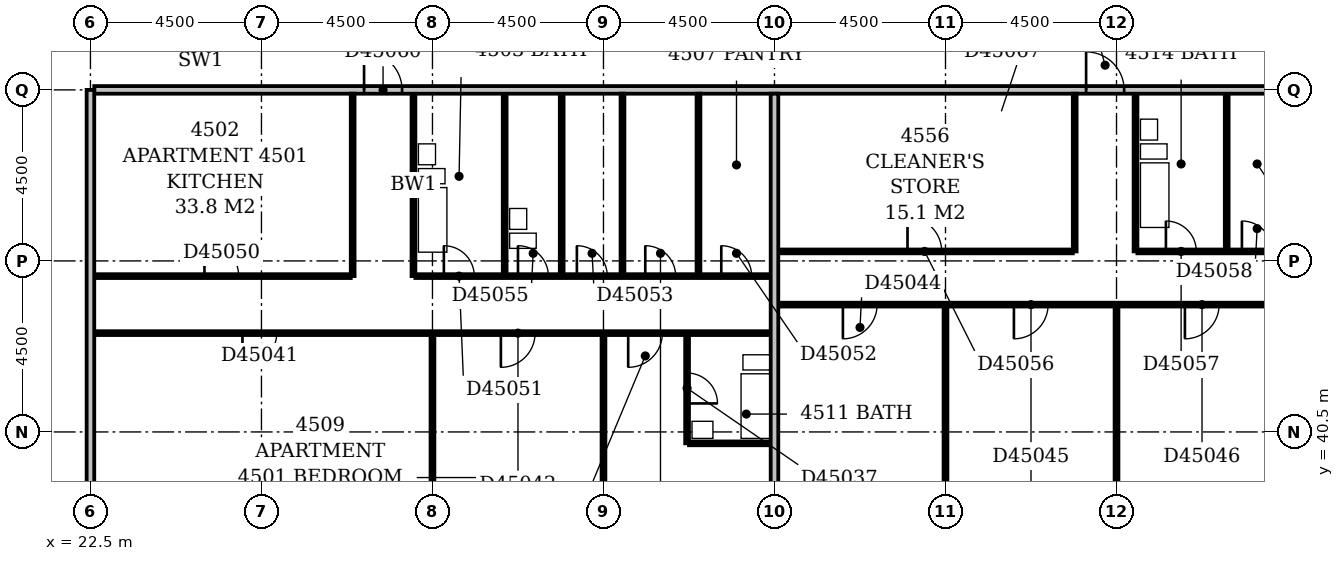
"""IFC4 building model, lengths in metres.
Left out: names, types, materials, properties, quantities, classifications, styles, units other than length and angle.
Written with IfcOpenShell. Run it as: python <this file> out.ifc"""

import sys

from ifc_helpers import new_model, si_unit, direction, frame, frame_2d, origin, place, context, subcontext, project, spatial, rectangle, extrude, element, fill, save


model = new_model("IFC4")
c1 = context("Model", 3, precision=1e-05, world=origin(), true_north=direction((0.0, 1.0)))
c2 = subcontext(c1, "Body", "Model", "MODEL_VIEW")
j1 = project(units=[si_unit("LENGTHUNIT", "METRE"), si_unit("PLANEANGLEUNIT", "RADIAN")], contexts=[c1])
p1 = place(None, origin())
s1 = spatial("IfcSite", under=j1, at=p1, CompositionType="ELEMENT")
p2 = place(p1, origin())
s2 = spatial("IfcBuilding", under=s1, at=p2, CompositionType="ELEMENT")
p3 = place(p2, frame((0.0, 0.0, 179.0)))
s3 = spatial("IfcBuildingStorey", under=s2, at=p3, CompositionType="ELEMENT", Elevation=179.0)
p4 = place(p3, frame((22.5, 36.45, 0.0), z_axis=(0.0, 0.0, 1.0), x_axis=(0.0, 1.0, 0.0)))
e1 = element("IfcWall", 1, at=p4, inside=s3, PredefinedType="PARTITIONING", context=c2, shape_type="SweptSolid", body=[
    extrude(rectangle(XDim=13.05, YDim=0.2, at=frame_2d((6.525, 0.0))), origin(), (0.0, 0.0, 1.0), 3.3),
])
p5 = place(p3, frame((31.5, 36.45, 0.0), z_axis=(0.0, 0.0, 1.0), x_axis=(0.0, 1.0, 0.0)))
e2 = element("IfcWall", 2, at=p5, inside=s3, PredefinedType="PARTITIONING", context=c2, shape_type="SweptSolid", body=[
    extrude(rectangle(XDim=6.6, YDim=0.1, at=frame_2d((3.3, 0.0))), origin(), (0.0, 0.0, 1.0), 3.3),
])
p6 = place(p3, frame((36.0, 36.45, 0.0), z_axis=(0.0, 0.0, 1.0), x_axis=(0.0, 1.0, 0.0)))
e3 = element("IfcWall", 3, at=p6, inside=s3, PredefinedType="PARTITIONING", context=c2, shape_type="SweptSolid", body=[
    extrude(rectangle(XDim=6.6, YDim=0.1, at=frame_2d((3.3, 0.0))), origin(), (0.0, 0.0, 1.0), 2.4),
])
p7 = place(p3, frame((40.5, 36.45, 0.0), z_axis=(0.0, 0.0, 1.0), x_axis=(0.0, 1.0, 0.0)))
e4 = element("IfcWall", 4, at=p7, inside=s3, PredefinedType="PARTITIONING", context=c2, shape_type="SweptSolid", body=[
    extrude(rectangle(XDim=12.95, YDim=0.2, at=frame_2d((6.475, 0.0))), origin(), (0.0, 0.0, 1.0), 3.3),
])
p8 = place(p3, frame((45.0, 36.45, 0.0), z_axis=(0.0, 0.0, 1.0), x_axis=(0.0, 1.0, 0.0)))
e5 = element("IfcWall", 5, at=p8, inside=s3, PredefinedType="PARTITIONING", context=c2, shape_type="SweptSolid", body=[
    extrude(rectangle(XDim=7.35, YDim=0.1, at=frame_2d((3.675, 0.0))), origin(), (0.0, 0.0, 1.0), 2.6),
])
p9 = place(p3, frame((49.5, 36.45, 0.0), z_axis=(0.0, 0.0, 1.0), x_axis=(0.0, 1.0, 0.0)))
e6 = element("IfcWall", 6, at=p9, inside=s3, PredefinedType="PARTITIONING", context=c2, shape_type="SweptSolid", body=[
    extrude(rectangle(XDim=7.35, YDim=0.1, at=frame_2d((3.675, 0.0))), origin(), (0.0, 0.0, 1.0), 3.3),
])
p10 = place(p3, frame((38.2, 40.2, 0.0), z_axis=(0.0, 0.0, 1.0), x_axis=(0.0, 1.0, 0.0)))
e7 = element("IfcWall", 7, at=p10, inside=s3, PredefinedType="PLUMBINGWALL", context=c2, shape_type="SweptSolid", body=[
    extrude(rectangle(XDim=2.85, YDim=0.1, at=frame_2d((1.425, 0.0))), origin(), (0.0, 0.0, 1.0), 3.3),
])
p11 = place(p10, frame((1.05, 0.0, 0.0)))
e8 = element("IfcOpeningElement", 8, at=p11, cuts=e7, PredefinedType="OPENING", context=c2, shape_type="SweptSolid", body=[
    extrude(rectangle(XDim=0.8, YDim=2.1, at=frame_2d((0.4, 1.05))), frame((0.0, 0.062, 0.0), z_axis=(0.0, -1.0, 0.0), x_axis=(1.0, 0.0, 0.0)), (0.0, 0.0, 1.0), 0.124),
])
p12 = place(p3, frame((38.25, 40.2, 0.0), z_axis=(0.0, 0.0, 1.0), x_axis=(1.0, 0.0, 0.0)))
e9 = element("IfcWall", 9, at=p12, inside=s3, PredefinedType="PLUMBINGWALL", context=c2, shape_type="SweptSolid", body=[
    extrude(rectangle(XDim=2.15, YDim=0.1, at=frame_2d((1.075, 0.0))), origin(), (0.0, 0.0, 1.0), 3.3),
])
p13 = place(p3, frame((22.6, 43.1, 0.0), z_axis=(0.0, 0.0, 1.0), x_axis=(1.0, 0.0, 0.0)))
e10 = element("IfcWall", 10, at=p13, inside=s3, PredefinedType="PARTITIONING", context=c2, shape_type="SweptSolid", body=[
    extrude(rectangle(XDim=17.8, YDim=0.1, at=frame_2d((8.9, 0.0))), origin(), (0.0, 0.0, 1.0), 3.3),
])
p14 = place(p13, frame((3.9, 0.0, 0.0)))
e11 = element("IfcOpeningElement", 11, at=p14, cuts=e10, PredefinedType="OPENING", context=c2, shape_type="SweptSolid", body=[
    extrude(rectangle(XDim=0.9, YDim=2.1, at=frame_2d((0.45, 1.05))), frame((0.0, 0.062, 0.0), z_axis=(0.0, -1.0, 0.0), x_axis=(1.0, 0.0, 0.0)), (0.0, 0.0, 1.0), 0.124),
])
p15 = place(p13, frame((10.7, 0.0, 0.0)))
e12 = element("IfcOpeningElement", 12, at=p15, cuts=e10, PredefinedType="OPENING", context=c2, shape_type="SweptSolid", body=[
    extrude(rectangle(XDim=0.9, YDim=2.1, at=frame_2d((0.45, 1.05))), frame((0.0, 0.062, 0.0), z_axis=(0.0, -1.0, 0.0), x_axis=(1.0, 0.0, 0.0)), (0.0, 0.0, 1.0), 0.124),
])
p16 = place(p13, frame((14.05, 0.0, 0.0)))
e13 = element("IfcOpeningElement", 13, at=p16, cuts=e10, PredefinedType="OPENING", context=c2, shape_type="SweptSolid", body=[
    extrude(rectangle(XDim=0.9, YDim=2.1, at=frame_2d((0.45, 1.05))), frame((0.0, 0.062, 0.0), z_axis=(0.0, -1.0, 0.0), x_axis=(1.0, 0.0, 0.0)), (0.0, 0.0, 1.0), 0.124),
])
p17 = place(p3, frame((40.6, 43.85, 0.0), z_axis=(0.0, 0.0, 1.0), x_axis=(1.0, 0.0, 0.0)))
e14 = element("IfcWall", 14, at=p17, inside=s3, PredefinedType="PARTITIONING", context=c2, shape_type="SweptSolid", body=[
    extrude(rectangle(XDim=13.3, YDim=0.1, at=frame_2d((6.65, 0.0))), origin(), (0.0, 0.0, 1.0), 3.3),
])
p18 = place(p17, frame((1.7, 0.0, 0.0)))
e15 = element("IfcOpeningElement", 15, at=p18, cuts=e14, PredefinedType="OPENING", context=c2, shape_type="SweptSolid", body=[
    extrude(rectangle(XDim=0.9, YDim=2.1, at=frame_2d((0.45, 1.05))), frame((0.0, 0.062, 0.0), z_axis=(0.0, -1.0, 0.0), x_axis=(1.0, 0.0, 0.0)), (0.0, 0.0, 1.0), 0.124),
])
p19 = place(p17, frame((6.2, 0.0, 0.0)))
e16 = element("IfcOpeningElement", 16, at=p19, cuts=e14, PredefinedType="OPENING", context=c2, shape_type="SweptSolid", body=[
    extrude(rectangle(XDim=0.9, YDim=2.1, at=frame_2d((0.45, 1.05))), frame((0.0, 0.062, 0.0), z_axis=(0.0, -1.0, 0.0), x_axis=(1.0, 0.0, 0.0)), (0.0, 0.0, 1.0), 0.124),
])
p20 = place(p17, frame((10.7, 0.0, 0.0)))
e17 = element("IfcOpeningElement", 17, at=p20, cuts=e14, PredefinedType="OPENING", context=c2, shape_type="SweptSolid", body=[
    extrude(rectangle(XDim=0.9, YDim=2.1, at=frame_2d((0.45, 1.05))), frame((0.0, 0.062, 0.0), z_axis=(0.0, -1.0, 0.0), x_axis=(1.0, 0.0, 0.0)), (0.0, 0.0, 1.0), 0.124),
])
p21 = place(p3, frame((22.6, 44.6, 0.0), z_axis=(0.0, 0.0, 1.0), x_axis=(1.0, 0.0, 0.0)))
e18 = element("IfcWall", 18, at=p21, inside=s3, PredefinedType="PARTITIONING", context=c2, shape_type="SweptSolid", body=[
    extrude(rectangle(XDim=6.75, YDim=0.1, at=frame_2d((3.375, 0.0))), origin(), (0.0, 0.0, 1.0), 3.3),
])
p22 = place(p21, frame((2.9, 0.0, 0.0)))
e19 = element("IfcOpeningElement", 19, at=p22, cuts=e18, PredefinedType="OPENING", context=c2, shape_type="SweptSolid", body=[
    extrude(rectangle(XDim=0.9, YDim=2.1, at=frame_2d((0.45, 1.05))), frame((0.0, 0.062, 0.0), z_axis=(0.0, -1.0, 0.0), x_axis=(1.0, 0.0, 0.0)), (0.0, 0.0, 1.0), 0.124),
])
p23 = place(p3, frame((29.4, 44.6, 0.0), z_axis=(0.0, 0.0, 1.0), x_axis=(0.0, 1.0, 0.0)))
e20 = element("IfcWall", 20, at=p23, inside=s3, PredefinedType="PARTITIONING", context=c2, shape_type="SweptSolid", body=[
    extrude(rectangle(XDim=4.8, YDim=0.1, at=frame_2d((2.4, 0.0))), origin(), (0.0, 0.0, 1.0), 3.3),
])
p24 = place(p3, frame((31.0, 44.6, 0.0), z_axis=(0.0, 0.0, 1.0), x_axis=(0.0, 1.0, 0.0)))
e21 = element("IfcWall", 21, at=p24, inside=s3, PredefinedType="PLUMBINGWALL", context=c2, shape_type="SweptSolid", body=[
    extrude(rectangle(XDim=4.8, YDim=0.1, at=frame_2d((2.4, 0.0))), origin(), (0.0, 0.0, 1.0), 3.3),
])
p25 = place(p3, frame((31.05, 44.6, 0.0), z_axis=(0.0, 0.0, 1.0), x_axis=(1.0, 0.0, 0.0)))
e22 = element("IfcWall", 22, at=p25, inside=s3, PredefinedType="PARTITIONING", context=c2, shape_type="SweptSolid", body=[
    extrude(rectangle(XDim=9.35, YDim=0.1, at=frame_2d((4.675, 0.0))), origin(), (0.0, 0.0, 1.0), 3.3),
])
p26 = place(p25, frame((0.75, 0.0, 0.0)))
e23 = element("IfcOpeningElement", 23, at=p26, cuts=e22, PredefinedType="OPENING", context=c2, shape_type="SweptSolid", body=[
    extrude(rectangle(XDim=0.8, YDim=2.1, at=frame_2d((0.4, 1.05))), frame((0.0, 0.062, 0.0), z_axis=(0.0, -1.0, 0.0), x_axis=(1.0, 0.0, 0.0)), (0.0, 0.0, 1.0), 0.124),
])
p27 = place(p25, frame((8.05, 0.0, 0.0)))
e24 = element("IfcOpeningElement", 24, at=p27, cuts=e22, PredefinedType="OPENING", context=c2, shape_type="SweptSolid", body=[
    extrude(rectangle(XDim=0.8, YDim=2.1, at=frame_2d((0.4, 1.05))), frame((0.0, 0.062, 0.0), z_axis=(0.0, -1.0, 0.0), x_axis=(1.0, 0.0, 0.0)), (0.0, 0.0, 1.0), 0.124),
])
p28 = place(p25, frame((4.25, 0.0, 0.0)))
e25 = element("IfcOpeningElement", 25, at=p28, cuts=e22, PredefinedType="OPENING", context=c2, shape_type="SweptSolid", body=[
    extrude(rectangle(XDim=0.8, YDim=2.1, at=frame_2d((0.4, 1.05))), frame((0.0, 0.062, 0.0), z_axis=(0.0, -1.0, 0.0), x_axis=(1.0, 0.0, 0.0)), (0.0, 0.0, 1.0), 0.124),
])
p29 = place(p25, frame((6.05, 0.0, 0.0)))
e26 = element("IfcOpeningElement", 26, at=p29, cuts=e22, PredefinedType="OPENING", context=c2, shape_type="SweptSolid", body=[
    extrude(rectangle(XDim=0.8, YDim=2.1, at=frame_2d((0.4, 1.05))), frame((0.0, 0.062, 0.0), z_axis=(0.0, -1.0, 0.0), x_axis=(1.0, 0.0, 0.0)), (0.0, 0.0, 1.0), 0.124),
])
p30 = place(p25, frame((2.7, 0.0, 0.0)))
e27 = element("IfcOpeningElement", 27, at=p30, cuts=e22, PredefinedType="OPENING", context=c2, shape_type="SweptSolid", body=[
    extrude(rectangle(XDim=0.8, YDim=2.1, at=frame_2d((0.4, 1.05))), frame((0.0, 0.062, 0.0), z_axis=(0.0, -1.0, 0.0), x_axis=(1.0, 0.0, 0.0)), (0.0, 0.0, 1.0), 0.124),
])
for number, where, z_axis, x_axis in (
    (28, (33.4, 44.65, 0.0), (0.0, 0.0, 1.0), (0.0, 1.0, 0.0)),
    (29, (34.9, 44.65, 0.0), (0.0, 0.0, 1.0), (0.0, 1.0, 0.0)),
):
    element("IfcWall", number, at=place(p3, frame(where, z_axis=z_axis, x_axis=x_axis)), inside=s3, PredefinedType="PLUMBINGWALL", context=c2, shape_type="SweptSolid", body=[
        extrude(rectangle(XDim=4.75, YDim=0.1, at=frame_2d((2.375, 0.0))), origin(), (0.0, 0.0, 1.0), 3.3),
    ])
p31 = place(p3, frame((36.5, 44.65, 0.0), z_axis=(0.0, 0.0, 1.0), x_axis=(0.0, 1.0, 0.0)))
e30 = element("IfcWall", 30, at=p31, inside=s3, PredefinedType="PARTITIONING", context=c2, shape_type="SweptSolid", body=[
    extrude(rectangle(XDim=4.75, YDim=0.1, at=frame_2d((2.375, 0.0))), origin(), (0.0, 0.0, 1.0), 2.4),
])
p32 = place(p3, frame((38.5, 44.65, 0.0), z_axis=(0.0, 0.0, 1.0), x_axis=(0.0, 1.0, 0.0)))
e31 = element("IfcWall", 31, at=p32, inside=s3, PredefinedType="PARTITIONING", context=c2, shape_type="SweptSolid", body=[
    extrude(rectangle(XDim=4.75, YDim=0.1, at=frame_2d((2.375, 0.0))), origin(), (0.0, 0.0, 1.0), 3.3),
])
p33 = place(p3, frame((40.6, 45.25, 0.0), z_axis=(0.0, 0.0, 1.0), x_axis=(1.0, 0.0, 0.0)))
e32 = element("IfcWall", 32, at=p33, inside=s3, PredefinedType="PARTITIONING", context=c2, shape_type="SweptSolid", body=[
    extrude(rectangle(XDim=7.75, YDim=0.1, at=frame_2d((3.875, 0.0))), origin(), (0.0, 0.0, 1.0), 3.3),
])
p34 = place(p33, frame((3.4, 0.0, 0.0)))
e33 = element("IfcOpeningElement", 33, at=p34, cuts=e32, PredefinedType="OPENING", context=c2, shape_type="SweptSolid", body=[
    extrude(rectangle(XDim=0.9, YDim=2.1, at=frame_2d((0.45, 1.05))), frame((0.0, 0.062, 0.0), z_axis=(0.0, -1.0, 0.0), x_axis=(1.0, 0.0, 0.0)), (0.0, 0.0, 1.0), 0.124),
])
p35 = place(p3, frame((48.4, 45.25, 0.0), z_axis=(0.0, 0.0, 1.0), x_axis=(0.0, 1.0, 0.0)))
e34 = element("IfcWall", 34, at=p35, inside=s3, PredefinedType="PARTITIONING", context=c2, shape_type="SweptSolid", body=[
    extrude(rectangle(XDim=4.15, YDim=0.1, at=frame_2d((2.075, 0.0))), origin(), (0.0, 0.0, 1.0), 3.3),
])
p36 = place(p3, frame((50.0, 45.25, 0.0), z_axis=(0.0, 0.0, 1.0), x_axis=(0.0, 1.0, 0.0)))
e35 = element("IfcWall", 35, at=p36, inside=s3, PredefinedType="PLUMBINGWALL", context=c2, shape_type="SweptSolid", body=[
    extrude(rectangle(XDim=4.15, YDim=0.1, at=frame_2d((2.075, 0.0))), origin(), (0.0, 0.0, 1.0), 3.3),
])
p37 = place(p3, frame((50.05, 45.25, 0.0), z_axis=(0.0, 0.0, 1.0), x_axis=(1.0, 0.0, 0.0)))
e36 = element("IfcWall", 36, at=p37, inside=s3, PredefinedType="PARTITIONING", context=c2, shape_type="SweptSolid", body=[
    extrude(rectangle(XDim=3.85, YDim=0.1, at=frame_2d((1.925, 0.0))), origin(), (0.0, 0.0, 1.0), 3.3),
])
p38 = place(p37, frame((0.75, 0.0, 0.0)))
e37 = element("IfcOpeningElement", 37, at=p38, cuts=e36, PredefinedType="OPENING", context=c2, shape_type="SweptSolid", body=[
    extrude(rectangle(XDim=0.8, YDim=2.1, at=frame_2d((0.4, 1.05))), frame((0.0, 0.062, 0.0), z_axis=(0.0, -1.0, 0.0), x_axis=(1.0, 0.0, 0.0)), (0.0, 0.0, 1.0), 0.124),
])
p39 = place(p37, frame((2.75, 0.0, 0.0)))
e38 = element("IfcOpeningElement", 38, at=p39, cuts=e36, PredefinedType="OPENING", context=c2, shape_type="SweptSolid", body=[
    extrude(rectangle(XDim=0.8, YDim=2.1, at=frame_2d((0.4, 1.05))), frame((0.0, 0.062, 0.0), z_axis=(0.0, -1.0, 0.0), x_axis=(1.0, 0.0, 0.0)), (0.0, 0.0, 1.0), 0.124),
])
p40 = place(p3, frame((52.4, 45.3, 0.0), z_axis=(0.0, 0.0, 1.0), x_axis=(0.0, 1.0, 0.0)))
e39 = element("IfcWall", 39, at=p40, inside=s3, PredefinedType="PLUMBINGWALL", context=c2, shape_type="SweptSolid", body=[
    extrude(rectangle(XDim=4.1, YDim=0.1, at=frame_2d((2.05, 0.0))), origin(), (0.0, 0.0, 1.0), 3.3),
])
p41 = place(p3, frame((22.6, 49.5, 0.0), z_axis=(0.0, 0.0, 1.0), x_axis=(1.0, 0.0, 0.0)))
e40 = element("IfcWall", 40, at=p41, inside=s3, PredefinedType="PARTITIONING", context=c2, shape_type="SweptSolid", body=[
    extrude(rectangle(XDim=44.45, YDim=0.2, at=frame_2d((22.225, 0.0))), origin(), (0.0, 0.0, 1.0), 3.3),
])
p42 = place(p41, frame((7.1, 0.0, 0.0)))
e41 = element("IfcOpeningElement", 41, at=p42, cuts=e40, PredefinedType="OPENING", context=c2, shape_type="SweptSolid", body=[
    extrude(rectangle(XDim=1.0, YDim=2.1, at=frame_2d((0.5, 1.05))), frame((0.0, 0.112, 0.0), z_axis=(0.0, -1.0, 0.0), x_axis=(1.0, 0.0, 0.0)), (0.0, 0.0, 1.0), 0.224),
])
p43 = place(p41, frame((26.1, 0.0, 0.0)))
e42 = element("IfcOpeningElement", 42, at=p43, cuts=e40, PredefinedType="OPENING", context=c2, shape_type="SweptSolid", body=[
    extrude(rectangle(XDim=1.0, YDim=2.1, at=frame_2d((0.5, 1.05))), frame((0.0, 0.112, 0.0), z_axis=(0.0, -1.0, 0.0), x_axis=(1.0, 0.0, 0.0)), (0.0, 0.0, 1.0), 0.224),
])
p44 = place(p41, frame((31.7, 0.0, 0.0)))
e43 = element("IfcOpeningElement", 43, at=p44, cuts=e40, PredefinedType="OPENING", context=c2, shape_type="SweptSolid", body=[
    extrude(rectangle(XDim=1.0, YDim=2.1, at=frame_2d((0.5, 1.05))), frame((0.0, 0.112, 0.0), z_axis=(0.0, -1.0, 0.0), x_axis=(1.0, 0.0, 0.0)), (0.0, 0.0, 1.0), 0.224),
])
p45 = place(p11, frame((0.8, 0.0, 0.0), z_axis=(0.0, 0.0, 1.0), x_axis=(-1.0, 0.0, 0.0)))
e44 = element("IfcDoor", 44, at=p45, inside=s3, OperationType="SINGLE_SWING_RIGHT", PredefinedType="DOOR", context=c2, shape_type="SweptSolid", body=[
    extrude(rectangle(XDim=0.8, YDim=2.1, at=frame_2d((0.4, 1.05))), frame((0.0, 0.025, 0.0), z_axis=(0.0, -1.0, 0.0), x_axis=(1.0, 0.0, 0.0)), (0.0, 0.0, 1.0), 0.05),
])
fill(e8, e44)
p46 = place(p14, frame((0.9, 0.0, 0.0), z_axis=(0.0, 0.0, 1.0), x_axis=(-1.0, 0.0, 0.0)))
e45 = element("IfcDoor", 45, at=p46, inside=s3, OperationType="SINGLE_SWING_RIGHT", PredefinedType="DOOR", context=c2, shape_type="SweptSolid", body=[
    extrude(rectangle(XDim=0.9, YDim=2.1, at=frame_2d((0.45, 1.05))), frame((0.0, 0.025, 0.0), z_axis=(0.0, -1.0, 0.0), x_axis=(1.0, 0.0, 0.0)), (0.0, 0.0, 1.0), 0.05),
])
fill(e11, e45)
p47 = place(p15, frame((0.9, 0.0, 0.0), z_axis=(0.0, 0.0, 1.0), x_axis=(-1.0, 0.0, 0.0)))
e46 = element("IfcDoor", 46, at=p47, inside=s3, OperationType="SINGLE_SWING_RIGHT", PredefinedType="DOOR", context=c2, shape_type="SweptSolid", body=[
    extrude(rectangle(XDim=0.9, YDim=2.1, at=frame_2d((0.45, 1.05))), frame((0.0, 0.025, 0.0), z_axis=(0.0, -1.0, 0.0), x_axis=(1.0, 0.0, 0.0)), (0.0, 0.0, 1.0), 0.05),
])
fill(e12, e46)
p48 = place(p16, frame((0.9, 0.0, 0.0), z_axis=(0.0, 0.0, 1.0), x_axis=(-1.0, 0.0, 0.0)))
e47 = element("IfcDoor", 47, at=p48, inside=s3, OperationType="SINGLE_SWING_RIGHT", PredefinedType="DOOR", context=c2, shape_type="SweptSolid", body=[
    extrude(rectangle(XDim=0.9, YDim=2.1, at=frame_2d((0.45, 1.05))), frame((0.0, 0.025, 0.0), z_axis=(0.0, -1.0, 0.0), x_axis=(1.0, 0.0, 0.0)), (0.0, 0.0, 1.0), 0.05),
])
fill(e13, e47)
p49 = place(p18, frame((0.9, 0.0, 0.0), z_axis=(0.0, 0.0, 1.0), x_axis=(-1.0, 0.0, 0.0)))
e48 = element("IfcDoor", 48, at=p49, inside=s3, OperationType="SINGLE_SWING_RIGHT", PredefinedType="DOOR", context=c2, shape_type="SweptSolid", body=[
    extrude(rectangle(XDim=0.9, YDim=2.1, at=frame_2d((0.45, 1.05))), frame((0.0, 0.025, 0.0), z_axis=(0.0, -1.0, 0.0), x_axis=(1.0, 0.0, 0.0)), (0.0, 0.0, 1.0), 0.05),
])
fill(e15, e48)
p50 = place(p19, frame((0.9, 0.0, 0.0), z_axis=(0.0, 0.0, 1.0), x_axis=(-1.0, 0.0, 0.0)))
e49 = element("IfcDoor", 49, at=p50, inside=s3, OperationType="SINGLE_SWING_RIGHT", PredefinedType="DOOR", context=c2, shape_type="SweptSolid", body=[
    extrude(rectangle(XDim=0.9, YDim=2.1, at=frame_2d((0.45, 1.05))), frame((0.0, 0.025, 0.0), z_axis=(0.0, -1.0, 0.0), x_axis=(1.0, 0.0, 0.0)), (0.0, 0.0, 1.0), 0.05),
])
fill(e16, e49)
p51 = place(p20, frame((0.9, 0.0, 0.0), z_axis=(0.0, 0.0, 1.0), x_axis=(-1.0, 0.0, 0.0)))
e50 = element("IfcDoor", 50, at=p51, inside=s3, OperationType="SINGLE_SWING_RIGHT", PredefinedType="DOOR", context=c2, shape_type="SweptSolid", body=[
    extrude(rectangle(XDim=0.9, YDim=2.1, at=frame_2d((0.45, 1.05))), frame((0.0, 0.025, 0.0), z_axis=(0.0, -1.0, 0.0), x_axis=(1.0, 0.0, 0.0)), (0.0, 0.0, 1.0), 0.05),
])
fill(e17, e50)
p52 = place(p22, origin())
e51 = element("IfcDoor", 51, at=p52, inside=s3, OperationType="SINGLE_SWING_LEFT", PredefinedType="DOOR", context=c2, shape_type="SweptSolid", body=[
    extrude(rectangle(XDim=0.9, YDim=2.1, at=frame_2d((0.45, 1.05))), frame((0.0, 0.025, 0.0), z_axis=(0.0, -1.0, 0.0), x_axis=(1.0, 0.0, 0.0)), (0.0, 0.0, 1.0), 0.05),
])
fill(e19, e51)
p53 = place(p26, origin())
e52 = element("IfcDoor", 52, at=p53, inside=s3, OperationType="SINGLE_SWING_LEFT", PredefinedType="DOOR", context=c2, shape_type="SweptSolid", body=[
    extrude(rectangle(XDim=0.8, YDim=2.1, at=frame_2d((0.4, 1.05))), frame((0.0, 0.025, 0.0), z_axis=(0.0, -1.0, 0.0), x_axis=(1.0, 0.0, 0.0)), (0.0, 0.0, 1.0), 0.05),
])
fill(e23, e52)
p54 = place(p27, origin())
e53 = element("IfcDoor", 53, at=p54, inside=s3, OperationType="SINGLE_SWING_LEFT", PredefinedType="DOOR", context=c2, shape_type="SweptSolid", body=[
    extrude(rectangle(XDim=0.8, YDim=2.1, at=frame_2d((0.4, 1.05))), frame((0.0, 0.025, 0.0), z_axis=(0.0, -1.0, 0.0), x_axis=(1.0, 0.0, 0.0)), (0.0, 0.0, 1.0), 0.05),
])
fill(e24, e53)
p55 = place(p28, origin())
e54 = element("IfcDoor", 54, at=p55, inside=s3, OperationType="SINGLE_SWING_LEFT", PredefinedType="DOOR", context=c2, shape_type="SweptSolid", body=[
    extrude(rectangle(XDim=0.8, YDim=2.1, at=frame_2d((0.4, 1.05))), frame((0.0, 0.025, 0.0), z_axis=(0.0, -1.0, 0.0), x_axis=(1.0, 0.0, 0.0)), (0.0, 0.0, 1.0), 0.05),
])
fill(e25, e54)
p56 = place(p29, origin())
e55 = element("IfcDoor", 55, at=p56, inside=s3, OperationType="SINGLE_SWING_LEFT", PredefinedType="DOOR", context=c2, shape_type="SweptSolid", body=[
    extrude(rectangle(XDim=0.8, YDim=2.1, at=frame_2d((0.4, 1.05))), frame((0.0, 0.025, 0.0), z_axis=(0.0, -1.0, 0.0), x_axis=(1.0, 0.0, 0.0)), (0.0, 0.0, 1.0), 0.05),
])
fill(e26, e55)
p57 = place(p30, origin())
e56 = element("IfcDoor", 56, at=p57, inside=s3, OperationType="SINGLE_SWING_LEFT", PredefinedType="DOOR", context=c2, shape_type="SweptSolid", body=[
    extrude(rectangle(XDim=0.8, YDim=2.1, at=frame_2d((0.4, 1.05))), frame((0.0, 0.025, 0.0), z_axis=(0.0, -1.0, 0.0), x_axis=(1.0, 0.0, 0.0)), (0.0, 0.0, 1.0), 0.05),
])
fill(e27, e56)
p58 = place(p34, origin())
e57 = element("IfcDoor", 57, at=p58, inside=s3, OperationType="SINGLE_SWING_LEFT", PredefinedType="DOOR", context=c2, shape_type="SweptSolid", body=[
    extrude(rectangle(XDim=0.9, YDim=2.1, at=frame_2d((0.45, 1.05))), frame((0.0, 0.025, 0.0), z_axis=(0.0, -1.0, 0.0), x_axis=(1.0, 0.0, 0.0)), (0.0, 0.0, 1.0), 0.05),
])
fill(e33, e57)
p59 = place(p38, origin())
e58 = element("IfcDoor", 58, at=p59, inside=s3, OperationType="SINGLE_SWING_LEFT", PredefinedType="DOOR", context=c2, shape_type="SweptSolid", body=[
    extrude(rectangle(XDim=0.8, YDim=2.1, at=frame_2d((0.4, 1.05))), frame((0.0, 0.025, 0.0), z_axis=(0.0, -1.0, 0.0), x_axis=(1.0, 0.0, 0.0)), (0.0, 0.0, 1.0), 0.05),
])
fill(e37, e58)
p60 = place(p39, origin())
e59 = element("IfcDoor", 59, at=p60, inside=s3, OperationType="SINGLE_SWING_LEFT", PredefinedType="DOOR", context=c2, shape_type="SweptSolid", body=[
    extrude(rectangle(XDim=0.8, YDim=2.1, at=frame_2d((0.4, 1.05))), frame((0.0, 0.025, 0.0), z_axis=(0.0, -1.0, 0.0), x_axis=(1.0, 0.0, 0.0)), (0.0, 0.0, 1.0), 0.05),
])
fill(e38, e59)
p61 = place(p42, origin())
e60 = element("IfcDoor", 60, at=p61, inside=s3, OperationType="SINGLE_SWING_LEFT", PredefinedType="DOOR", context=c2, shape_type="SweptSolid", body=[
    extrude(rectangle(XDim=1.0, YDim=2.1, at=frame_2d((0.5, 1.05))), frame((0.0, 0.025, 0.0), z_axis=(0.0, -1.0, 0.0), x_axis=(1.0, 0.0, 0.0)), (0.0, 0.0, 1.0), 0.05),
])
fill(e41, e60)
p62 = place(p43, origin())
e61 = element("IfcDoor", 61, at=p62, inside=s3, OperationType="SINGLE_SWING_LEFT", PredefinedType="DOOR", context=c2, shape_type="SweptSolid", body=[
    extrude(rectangle(XDim=1.0, YDim=2.1, at=frame_2d((0.5, 1.05))), frame((0.0, 0.025, 0.0), z_axis=(0.0, -1.0, 0.0), x_axis=(1.0, 0.0, 0.0)), (0.0, 0.0, 1.0), 0.05),
])
fill(e42, e61)
save(model, sys.argv[1])
